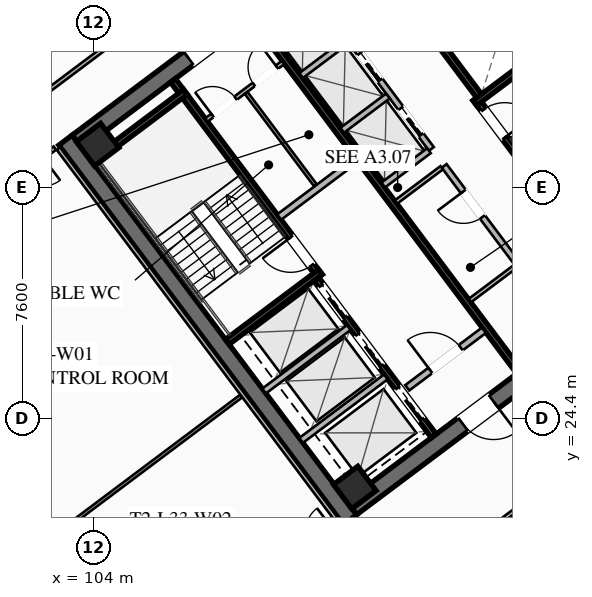
"""IFC4 building model, lengths in metres.
Left out: names, types, materials, properties, quantities, classifications, styles, units other than length and angle.
Written with IfcOpenShell. Run it as: python <this file> out.ifc"""

import sys

from ifc_helpers import new_model, si_unit, direction, frame, frame_2d, origin, origin_2d, place, context, subcontext, project, spatial, rectangle, hollow_rectangle, extrude, element, fill, save


model = new_model("IFC4")
c1 = context("Model", 3, precision=1e-05, world=origin(), true_north=direction((0.0, 1.0)))
c2 = subcontext(c1, "Body", "Model", "MODEL_VIEW")
j1 = project(units=[si_unit("LENGTHUNIT", "METRE"), si_unit("PLANEANGLEUNIT", "RADIAN")], contexts=[c1])
p1 = place(None, origin())
s1 = spatial("IfcSite", under=j1, at=p1, CompositionType="ELEMENT")
p2 = place(p1, origin())
s2 = spatial("IfcBuilding", under=s1, at=p2, CompositionType="ELEMENT")
p3 = place(p2, frame((0.0, 0.0, 125.05)))
s3 = spatial("IfcBuildingStorey", under=s2, at=p3, CompositionType="ELEMENT", Elevation=125.05)
for number, where, z_axis, x_axis in (
    (1, (112.436, 21.077, 0.0), (0.0, 0.0, 1.0), (-0.6, 0.8, 0.0)),
    (2, (115.564, 42.923, 0.0), (0.0, 0.0, 1.0), (0.6, -0.8, 0.0)),
):
    element("IfcWall", number, at=place(p3, frame(where, z_axis=z_axis, x_axis=x_axis)), inside=s3, PredefinedType="SHEAR", context=c2, shape_type="SweptSolid", body=[
        extrude(rectangle(XDim=15.6, YDim=0.55, at=frame_2d((7.8, 0.0))), origin(), (0.0, 0.0, 1.0), 3.55),
    ])
p4 = place(p3, frame((124.539, 30.498, 0.0), z_axis=(0.0, 0.0, 1.0), x_axis=(-0.799998054672, -0.600002593761, 0.0)))
e3 = element("IfcWall", 3, at=p4, inside=s3, PredefinedType="SHEAR", context=c2, shape_type="SweptSolid", body=[
    extrude(rectangle(XDim=15.06, YDim=0.55, at=frame_2d((7.53, 0.0))), origin(), (0.0, 0.0, 1.0), 3.55),
])
p5 = place(p4, frame((9.23, 0.0, 0.0)))
e4 = element("IfcOpeningElement", 4, at=p5, cuts=e3, PredefinedType="OPENING", context=c2, shape_type="SweptSolid", body=[
    extrude(rectangle(XDim=1.25, YDim=2.25, at=frame_2d((0.625, 1.125))), frame((0.0, 0.285, 0.0), z_axis=(0.0, -1.0, 0.0), x_axis=(1.0, 0.0, 0.0)), (0.0, 0.0, 1.0), 0.57),
])
p6 = place(p4, frame((4.18, 0.0, 0.0)))
e5 = element("IfcOpeningElement", 5, at=p6, cuts=e3, PredefinedType="OPENING", context=c2, shape_type="SweptSolid", body=[
    extrude(rectangle(XDim=1.25, YDim=2.25, at=frame_2d((0.625, 1.125))), frame((0.0, 0.285, 0.0), z_axis=(0.0, -1.0, 0.0), x_axis=(1.0, 0.0, 0.0)), (0.0, 0.0, 1.0), 0.57),
])
p7 = place(p3, frame((103.461, 33.502, 0.0), z_axis=(0.0, 0.0, 1.0), x_axis=(0.799998054672, 0.600002593761, 0.0)))
e6 = element("IfcWall", 6, at=p7, inside=s3, PredefinedType="SHEAR", context=c2, shape_type="SweptSolid", body=[
    extrude(rectangle(XDim=15.06, YDim=0.55, at=frame_2d((7.53, 0.0))), origin(), (0.0, 0.0, 1.0), 3.55),
])
p8 = place(p7, frame((4.58, 0.0, 0.0)))
e7 = element("IfcOpeningElement", 7, at=p8, cuts=e6, PredefinedType="OPENING", context=c2, shape_type="SweptSolid", body=[
    extrude(rectangle(XDim=1.25, YDim=2.25, at=frame_2d((0.625, 1.125))), frame((0.0, 0.285, 0.0), z_axis=(0.0, -1.0, 0.0), x_axis=(1.0, 0.0, 0.0)), (0.0, 0.0, 1.0), 0.57),
])
p9 = place(p7, frame((9.63, 0.0, 0.0)))
e8 = element("IfcOpeningElement", 8, at=p9, cuts=e6, PredefinedType="OPENING", context=c2, shape_type="SweptSolid", body=[
    extrude(rectangle(XDim=1.25, YDim=2.25, at=frame_2d((0.625, 1.125))), frame((0.0, 0.285, 0.0), z_axis=(0.0, -1.0, 0.0), x_axis=(1.0, 0.0, 0.0)), (0.0, 0.0, 1.0), 0.57),
])
for number, where, z_axis, x_axis in (
    (9, (112.59, 22.13, 0.0), (0.0, 0.0, 1.0), (0.8, 0.6, 0.0)),
    (10, (104.13, 33.41, 0.0), (0.0, 0.0, 1.0), (0.8, 0.6, 0.0)),
):
    element("IfcColumn", number, at=place(p3, frame(where, z_axis=z_axis, x_axis=x_axis)), inside=s3, PredefinedType="COLUMN", context=c2, shape_type="SweptSolid", body=[
        extrude(hollow_rectangle(XDim=1.0, YDim=1.0, WallThickness=0.04, at=origin_2d()), origin(), (0.0, 0.0, 1.0), 3.37),
    ])
p10 = place(p3, frame((111.44, 29.08, 0.0), z_axis=(0.0, 0.0, 1.0), x_axis=(-0.59999029481, 0.8000072788, 0.0)))
e11 = element("IfcWall", 11, at=p10, inside=s3, PredefinedType="SHEAR", context=c2, shape_type="SweptSolid", body=[
    extrude(rectangle(XDim=8.05, YDim=0.2, at=frame_2d((4.025, 0.0))), origin(), (0.0, 0.0, 1.0), 3.37),
])
p11 = place(p10, frame((0.45, 0.0, 0.0)))
e12 = element("IfcOpeningElement", 12, at=p11, cuts=e11, PredefinedType="OPENING", context=c2, shape_type="SweptSolid", body=[
    extrude(rectangle(XDim=1.15, YDim=2.2, at=frame_2d((0.575, 1.1))), frame((0.0, 0.11, 0.0), z_axis=(0.0, -1.0, 0.0), x_axis=(1.0, 0.0, 0.0)), (0.0, 0.0, 1.0), 0.22),
])
for number, where, z_axis, x_axis in (
    (13, (108.396, 26.922, 0.0), (0.0, 0.0, 1.0), (0.8, 0.6, 0.0)),
    (14, (103.956, 32.842, 0.0), (0.0, 0.0, 1.0), (0.8, 0.6, 0.0)),
):
    element("IfcWall", number, at=place(p3, frame(where, z_axis=z_axis, x_axis=x_axis)), inside=s3, PredefinedType="SHEAR", context=c2, shape_type="SweptSolid", body=[
        extrude(rectangle(XDim=3.83, YDim=0.2, at=frame_2d((1.915, 0.0))), origin(), (0.0, 0.0, 1.0), 3.37),
    ])
p12 = place(p3, frame((116.56, 34.92, 0.0), z_axis=(0.0, 0.0, 1.0), x_axis=(0.59999029481, -0.8000072788, 0.0)))
e15 = element("IfcWall", 15, at=p12, inside=s3, PredefinedType="SHEAR", context=c2, shape_type="SweptSolid", body=[
    extrude(rectangle(XDim=8.05, YDim=0.2, at=frame_2d((4.025, 0.0))), origin(), (0.0, 0.0, 1.0), 3.37),
])
p13 = place(p12, frame((0.45, 0.0, 0.0)))
e16 = element("IfcOpeningElement", 16, at=p13, cuts=e15, PredefinedType="OPENING", context=c2, shape_type="SweptSolid", body=[
    extrude(rectangle(XDim=1.15, YDim=2.2, at=frame_2d((0.575, 1.1))), frame((0.0, 0.11, 0.0), z_axis=(0.0, -1.0, 0.0), x_axis=(1.0, 0.0, 0.0)), (0.0, 0.0, 1.0), 0.22),
])
p14 = place(p3, frame((116.54, 34.78, 0.0), z_axis=(0.0, 0.0, 1.0), x_axis=(0.800015298837, 0.599979601008, 0.0)))
e17 = element("IfcWall", 17, at=p14, inside=s3, PredefinedType="SHEAR", context=c2, shape_type="SweptSolid", body=[
    extrude(rectangle(XDim=3.83, YDim=0.2, at=frame_2d((1.915, 0.0))), origin(), (0.0, 0.0, 1.0), 3.37),
])
p15 = place(p3, frame((117.998, 25.936, 0.0), z_axis=(0.0, 0.0, 1.0), x_axis=(-0.600002693989, 0.799997979501, 0.0)))
e18 = element("IfcWall", 18, at=p15, inside=s3, PredefinedType="SHEAR", context=c2, shape_type="SweptSolid", body=[
    extrude(rectangle(XDim=14.5, YDim=0.2, at=frame_2d((7.25, 0.0))), origin(), (0.0, 0.0, 1.0), 3.37),
])
p16 = place(p3, frame((110.104, 31.028, 0.0), z_axis=(0.0, 0.0, 1.0), x_axis=(0.800018601094, 0.59997519774, 0.0)))
e19 = element("IfcWall", 19, at=p16, inside=s3, PredefinedType="SOLIDWALL", context=c2, shape_type="SweptSolid", body=[
    extrude(rectangle(XDim=3.15, YDim=0.22, at=frame_2d((1.575, 0.0))), origin(), (0.0, 0.0, 1.0), 2.723),
])
p17 = place(p3, frame((114.316, 25.412, 0.0), z_axis=(0.0, 0.0, 1.0), x_axis=(0.800018601094, 0.59997519774, 0.0)))
e20 = element("IfcWall", 20, at=p17, inside=s3, PredefinedType="SOLIDWALL", context=c2, shape_type="SweptSolid", body=[
    extrude(rectangle(XDim=3.15, YDim=0.22, at=frame_2d((1.575, 0.0))), origin(), (0.0, 0.0, 1.0), 2.723),
])
p18 = place(p17, frame((0.95, 0.0, 0.0)))
e21 = element("IfcOpeningElement", 21, at=p18, cuts=e20, PredefinedType="OPENING", context=c2, shape_type="SweptSolid", body=[
    extrude(rectangle(XDim=1.25, YDim=2.25, at=frame_2d((0.625, 1.125))), frame((0.0, 0.12, 0.0), z_axis=(0.0, -1.0, 0.0), x_axis=(1.0, 0.0, 0.0)), (0.0, 0.0, 1.0), 0.24),
])
p19 = place(p3, frame((115.19, 23.83, 0.0), z_axis=(0.0, 0.0, 1.0), x_axis=(-0.599993943644, 0.800004542231, 0.0)))
e22 = element("IfcWall", 22, at=p19, inside=s3, PredefinedType="SHEAR", context=c2, shape_type="SweptSolid", body=[
    extrude(rectangle(XDim=6.45, YDim=0.2, at=frame_2d((3.225, 0.0))), origin(), (0.0, 0.0, 1.0), 3.37),
])
p20 = place(p19, frame((4.875, 0.0, 0.0)))
e23 = element("IfcOpeningElement", 23, at=p20, cuts=e22, PredefinedType="OPENING", context=c2, shape_type="SweptSolid", body=[
    extrude(rectangle(XDim=1.3, YDim=2.25, at=frame_2d((0.65, 1.125))), frame((0.0, 0.11, 0.0), z_axis=(0.0, -1.0, 0.0), x_axis=(1.0, 0.0, 0.0)), (0.0, 0.0, 1.0), 0.22),
])
p21 = place(p19, frame((2.875, 0.0, 0.0)))
e24 = element("IfcOpeningElement", 24, at=p21, cuts=e22, PredefinedType="OPENING", context=c2, shape_type="SweptSolid", body=[
    extrude(rectangle(XDim=1.3, YDim=2.25, at=frame_2d((0.65, 1.125))), frame((0.0, 0.11, 0.0), z_axis=(0.0, -1.0, 0.0), x_axis=(1.0, 0.0, 0.0)), (0.0, 0.0, 1.0), 0.22),
])
p22 = place(p19, frame((0.675, 0.0, 0.0)))
e25 = element("IfcOpeningElement", 25, at=p22, cuts=e22, PredefinedType="OPENING", context=c2, shape_type="SweptSolid", body=[
    extrude(rectangle(XDim=1.3, YDim=2.25, at=frame_2d((0.65, 1.125))), frame((0.0, 0.11, 0.0), z_axis=(0.0, -1.0, 0.0), x_axis=(1.0, 0.0, 0.0)), (0.0, 0.0, 1.0), 0.22),
])
for number, where, z_axis, x_axis in (
    (26, (110.826, 23.682, 0.0), (0.0, 0.0, 1.0), (0.8, 0.6, 0.0)),
    (27, (109.608, 25.306, 0.0), (0.0, 0.0, 1.0), (0.8, 0.6, 0.0)),
):
    element("IfcWall", number, at=place(p3, frame(where, z_axis=z_axis, x_axis=x_axis)), inside=s3, PredefinedType="SOLIDWALL", context=c2, shape_type="SweptSolid", body=[
        extrude(rectangle(XDim=3.48, YDim=0.2, at=frame_2d((1.74, 0.0))), origin(), (0.0, 0.0, 1.0), 3.37),
    ])
p23 = place(p3, frame((112.81, 40.17, 0.0), z_axis=(0.0, 0.0, 1.0), x_axis=(0.599993943644, -0.800004542231, 0.0)))
e28 = element("IfcWall", 28, at=p23, inside=s3, PredefinedType="SHEAR", context=c2, shape_type="SweptSolid", body=[
    extrude(rectangle(XDim=6.45, YDim=0.2, at=frame_2d((3.225, 0.0))), origin(), (0.0, 0.0, 1.0), 3.37),
])
p24 = place(p3, frame((107.71, 34.22, 0.0), z_axis=(0.0, 0.0, 1.0), x_axis=(0.799981399002, 0.60002480053, 0.0)))
e29 = element("IfcWall", 29, at=p24, inside=s3, PredefinedType="PARTITIONING", context=c2, shape_type="SweptSolid", body=[
    extrude(rectangle(XDim=3.15, YDim=0.135, at=frame_2d((1.575, 0.0))), origin(), (0.0, 0.0, 1.0), 2.723),
])
p25 = place(p24, frame((0.25, 0.0, 0.0)))
e30 = element("IfcOpeningElement", 30, at=p25, cuts=e29, PredefinedType="OPENING", context=c2, shape_type="SweptSolid", body=[
    extrude(rectangle(XDim=0.95, YDim=2.05, at=frame_2d((0.475, 1.025))), frame((0.0, 0.077, 0.0), z_axis=(0.0, -1.0, 0.0), x_axis=(1.0, 0.0, 0.0)), (0.0, 0.0, 1.0), 0.155),
])
p26 = place(p24, frame((1.95, 0.0, 0.0)))
e31 = element("IfcOpeningElement", 31, at=p26, cuts=e29, PredefinedType="OPENING", context=c2, shape_type="SweptSolid", body=[
    extrude(rectangle(XDim=0.95, YDim=2.05, at=frame_2d((0.475, 1.025))), frame((0.0, 0.077, 0.0), z_axis=(0.0, -1.0, 0.0), x_axis=(1.0, 0.0, 0.0)), (0.0, 0.0, 1.0), 0.155),
])
p27 = place(p3, frame((111.296, 32.072, 0.0), z_axis=(0.0, 0.0, 1.0), x_axis=(-0.59995887973, 0.800030838552, 0.0)))
e32 = element("IfcWall", 32, at=p27, inside=s3, PredefinedType="PARTITIONING", context=c2, shape_type="SweptSolid", body=[
    extrude(rectangle(XDim=3.8, YDim=0.11, at=frame_2d((1.9, 0.0))), origin(), (0.0, 0.0, 1.0), 2.723),
])
p28 = place(p3, frame((119.67, 27.19, 0.0), z_axis=(0.0, 0.0, 1.0), x_axis=(-0.599988677396, 0.800008491828, 0.0)))
e33 = element("IfcWall", 33, at=p28, inside=s3, PredefinedType="SOLIDWALL", context=c2, shape_type="SweptSolid", body=[
    extrude(rectangle(XDim=6.9, YDim=0.2, at=frame_2d((3.45, 0.0))), origin(), (0.0, 0.0, 1.0), 2.723),
])
p29 = place(p28, frame((0.85, 0.0, 0.0)))
e34 = element("IfcOpeningElement", 34, at=p29, cuts=e33, PredefinedType="OPENING", context=c2, shape_type="SweptSolid", body=[
    extrude(rectangle(XDim=0.95, YDim=2.05, at=frame_2d((0.475, 1.025))), frame((0.0, 0.11, 0.0), z_axis=(0.0, -1.0, 0.0), x_axis=(1.0, 0.0, 0.0)), (0.0, 0.0, 1.0), 0.22),
])
p30 = place(p28, frame((4.8, 0.0, 0.0)))
e35 = element("IfcOpeningElement", 35, at=p30, cuts=e33, PredefinedType="OPENING", context=c2, shape_type="SweptSolid", body=[
    extrude(rectangle(XDim=1.05, YDim=2.2, at=frame_2d((0.525, 1.1))), frame((0.0, 0.11, 0.0), z_axis=(0.0, -1.0, 0.0), x_axis=(1.0, 0.0, 0.0)), (0.0, 0.0, 1.0), 0.22),
])
for number, where, z_axis, x_axis in (
    (36, (113.946, 31.522, 0.0), (0.0, 0.0, 1.0), (0.8, 0.6, 0.0)),
    (37, (116.376, 28.282, 0.0), (0.0, 0.0, 1.0), (0.8, 0.6, 0.0)),
):
    element("IfcWall", number, at=place(p3, frame(where, z_axis=z_axis, x_axis=x_axis)), inside=s3, PredefinedType="PARTITIONING", context=c2, shape_type="SweptSolid", body=[
        extrude(rectangle(XDim=1.88, YDim=0.135, at=frame_2d((0.94, 0.0))), origin(), (0.0, 0.0, 1.0), 2.723),
    ])
p31 = place(p3, frame((115.11, 33.27, 0.0), z_axis=(0.0, 0.0, 1.0), x_axis=(-0.600011322243, 0.799991508192, 0.0)))
e38 = element("IfcWall", 38, at=p31, inside=s3, PredefinedType="SOLIDWALL", context=c2, shape_type="SweptSolid", body=[
    extrude(rectangle(XDim=6.9, YDim=0.2, at=frame_2d((3.45, 0.0))), origin(), (0.0, 0.0, 1.0), 3.37),
])
p32 = place(p31, frame((0.575, 0.0, 0.0)))
e39 = element("IfcOpeningElement", 39, at=p32, cuts=e38, PredefinedType="OPENING", context=c2, shape_type="SweptSolid", body=[
    extrude(rectangle(XDim=1.1, YDim=2.2, at=frame_2d((0.55, 1.1))), frame((0.0, 0.11, 0.0), z_axis=(0.0, -1.0, 0.0), x_axis=(1.0, 0.0, 0.0)), (0.0, 0.0, 1.0), 0.22),
])
p33 = place(p31, frame((2.825, 0.0, 0.0)))
e40 = element("IfcOpeningElement", 40, at=p33, cuts=e38, PredefinedType="OPENING", context=c2, shape_type="SweptSolid", body=[
    extrude(rectangle(XDim=1.1, YDim=2.2, at=frame_2d((0.55, 1.1))), frame((0.0, 0.11, 0.0), z_axis=(0.0, -1.0, 0.0), x_axis=(1.0, 0.0, 0.0)), (0.0, 0.0, 1.0), 0.22),
])
p34 = place(p31, frame((5.075, 0.0, 0.0)))
e41 = element("IfcOpeningElement", 41, at=p34, cuts=e38, PredefinedType="OPENING", context=c2, shape_type="SweptSolid", body=[
    extrude(rectangle(XDim=1.1, YDim=2.2, at=frame_2d((0.55, 1.1))), frame((0.0, 0.11, 0.0), z_axis=(0.0, -1.0, 0.0), x_axis=(1.0, 0.0, 0.0)), (0.0, 0.0, 1.0), 0.22),
])
p35 = place(p3, frame((113.526, 32.082, 0.0), z_axis=(0.0, 0.0, 1.0), x_axis=(0.800046745961, 0.599937666993, 0.0)))
e42 = element("IfcWall", 42, at=p35, inside=s3, PredefinedType="SOLIDWALL", context=c2, shape_type="SweptSolid", body=[
    extrude(rectangle(XDim=1.88, YDim=0.2, at=frame_2d((0.94, 0.0))), origin(), (0.0, 0.0, 1.0), 3.37),
])
p36 = place(p3, frame((112.176, 33.882, 0.0), z_axis=(0.0, 0.0, 1.0), x_axis=(0.8, 0.6, 0.0)))
e43 = element("IfcWall", 43, at=p36, inside=s3, PredefinedType="SOLIDWALL", context=c2, shape_type="SweptSolid", body=[
    extrude(rectangle(XDim=1.88, YDim=0.2, at=frame_2d((0.94, 0.0))), origin(), (0.0, 0.0, 1.0), 3.37),
])
p37 = place(p3, frame((110.826, 35.682, 0.0), z_axis=(0.0, 0.0, 1.0), x_axis=(0.799984418148, 0.600020775241, 0.0)))
e44 = element("IfcWall", 44, at=p37, inside=s3, PredefinedType="SOLIDWALL", context=c2, shape_type="SweptSolid", body=[
    extrude(rectangle(XDim=1.88, YDim=0.2, at=frame_2d((0.94, 0.0))), origin(), (0.0, 0.0, 1.0), 3.37),
])
p38 = place(p3, frame((95.81, 30.17, 0.0), z_axis=(0.0, 0.0, 1.0), x_axis=(0.8, 0.6, 0.0)))
e45 = element("IfcWall", 45, at=p38, inside=s3, PredefinedType="PARTITIONING", context=c2, shape_type="SweptSolid", body=[
    extrude(rectangle(XDim=31.3, YDim=0.135, at=frame_2d((15.65, 0.0))), origin(), (0.0, 0.0, 1.0), 2.723),
])
p39 = place(p38, frame((0.3, 0.0, 0.0)))
e46 = element("IfcOpeningElement", 46, at=p39, cuts=e45, PredefinedType="OPENING", context=c2, shape_type="SweptSolid", body=[
    extrude(rectangle(XDim=0.95, YDim=2.05, at=frame_2d((0.475, 1.025))), frame((0.0, 0.077, 0.0), z_axis=(0.0, -1.0, 0.0), x_axis=(1.0, 0.0, 0.0)), (0.0, 0.0, 1.0), 0.155),
])
p40 = place(p38, frame((15.438, 0.0, 0.0)))
e47 = element("IfcOpeningElement", 47, at=p40, cuts=e45, PredefinedType="OPENING", context=c2, shape_type="SweptSolid", body=[
    extrude(rectangle(XDim=0.95, YDim=2.05, at=frame_2d((0.475, 1.025))), frame((0.0, 0.077, 0.0), z_axis=(0.0, -1.0, 0.0), x_axis=(1.0, 0.0, 0.0)), (0.0, 0.0, 1.0), 0.155),
])
p41 = place(p38, frame((30.05, 0.0, 0.0)))
e48 = element("IfcOpeningElement", 48, at=p41, cuts=e45, PredefinedType="OPENING", context=c2, shape_type="SweptSolid", body=[
    extrude(rectangle(XDim=0.95, YDim=2.05, at=frame_2d((0.475, 1.025))), frame((0.0, 0.077, 0.0), z_axis=(0.0, -1.0, 0.0), x_axis=(1.0, 0.0, 0.0)), (0.0, 0.0, 1.0), 0.155),
])
p42 = place(p3, frame((133.012, 32.734, 0.0), z_axis=(0.0, 0.0, 1.0), x_axis=(-0.800003744006, -0.59999500796, 0.0)))
e49 = element("IfcWall", 49, at=p42, inside=s3, PredefinedType="PARTITIONING", context=c2, shape_type="SweptSolid", body=[
    extrude(rectangle(XDim=31.3, YDim=0.135, at=frame_2d((15.65, 0.0))), origin(), (0.0, 0.0, 1.0), 2.723),
])
p43 = place(p42, frame((29.97, 0.0, 0.0)))
e50 = element("IfcOpeningElement", 50, at=p43, cuts=e49, PredefinedType="OPENING", context=c2, shape_type="SweptSolid", body=[
    extrude(rectangle(XDim=0.95, YDim=2.05, at=frame_2d((0.475, 1.025))), frame((0.0, 0.077, 0.0), z_axis=(0.0, -1.0, 0.0), x_axis=(1.0, 0.0, 0.0)), (0.0, 0.0, 1.0), 0.155),
])
p44 = place(p42, frame((14.938, 0.0, 0.0)))
e51 = element("IfcOpeningElement", 51, at=p44, cuts=e49, PredefinedType="OPENING", context=c2, shape_type="SweptSolid", body=[
    extrude(rectangle(XDim=0.95, YDim=2.05, at=frame_2d((0.475, 1.025))), frame((0.0, 0.077, 0.0), z_axis=(0.0, -1.0, 0.0), x_axis=(1.0, 0.0, 0.0)), (0.0, 0.0, 1.0), 0.155),
])
p45 = place(p42, frame((0.38, 0.0, 0.0)))
e52 = element("IfcOpeningElement", 52, at=p45, cuts=e49, PredefinedType="OPENING", context=c2, shape_type="SweptSolid", body=[
    extrude(rectangle(XDim=0.95, YDim=2.05, at=frame_2d((0.475, 1.025))), frame((0.0, 0.077, 0.0), z_axis=(0.0, -1.0, 0.0), x_axis=(1.0, 0.0, 0.0)), (0.0, 0.0, 1.0), 0.155),
])
p46 = place(p3, frame((112.104, 20.928, 0.0), z_axis=(0.0, 0.0, 1.0), x_axis=(-0.599994940075, 0.800003794918, 0.0)))
e53 = element("IfcWall", 53, at=p46, inside=s3, PredefinedType="PARTITIONING", context=c2, shape_type="SweptSolid", body=[
    extrude(rectangle(XDim=15.44, YDim=0.135, at=frame_2d((7.72, 0.0))), origin(), (0.0, 0.0, 1.0), 2.723),
])
p47 = place(p3, frame((102.728, 33.296, 0.0), z_axis=(0.0, 0.0, 1.0), x_axis=(-0.800002918023, -0.599996109283, 0.0)))
e54 = element("IfcWall", 54, at=p47, inside=s3, PredefinedType="PARTITIONING", context=c2, shape_type="SweptSolid", body=[
    extrude(rectangle(XDim=10.04, YDim=0.135, at=frame_2d((5.02, 0.0))), origin(), (0.0, 0.0, 1.0), 2.723),
])
p48 = place(p47, frame((0.5, 0.0, 0.0)))
e55 = element("IfcOpeningElement", 55, at=p48, cuts=e54, PredefinedType="OPENING", context=c2, shape_type="SweptSolid", body=[
    extrude(rectangle(XDim=0.95, YDim=2.05, at=frame_2d((0.475, 1.025))), frame((0.0, 0.077, 0.0), z_axis=(0.0, -1.0, 0.0), x_axis=(1.0, 0.0, 0.0)), (0.0, 0.0, 1.0), 0.155),
])
p49 = place(p3, frame((100.816, 19.112, 0.0), z_axis=(0.0, 0.0, 1.0), x_axis=(0.800002918023, 0.599996109283, 0.0)))
e56 = element("IfcWall", 56, at=p49, inside=s3, PredefinedType="PARTITIONING", context=c2, shape_type="SweptSolid", body=[
    extrude(rectangle(XDim=10.04, YDim=0.11, at=frame_2d((5.02, 0.0))), origin(), (0.0, 0.0, 1.0), 2.723),
])
p50 = place(p8, origin())
e57 = element("IfcDoor", 57, at=p50, inside=s3, OperationType="SINGLE_SWING_LEFT", PredefinedType="DOOR", context=c2, shape_type="SweptSolid", body=[
    extrude(rectangle(XDim=1.25, YDim=2.25, at=frame_2d((0.625, 1.125))), frame((0.0, 0.025, 0.0), z_axis=(0.0, -1.0, 0.0), x_axis=(1.0, 0.0, 0.0)), (0.0, 0.0, 1.0), 0.05),
])
fill(e7, e57)
p51 = place(p5, origin())
e58 = element("IfcDoor", 58, at=p51, inside=s3, OperationType="SINGLE_SWING_LEFT", PredefinedType="DOOR", context=c2, shape_type="SweptSolid", body=[
    extrude(rectangle(XDim=1.25, YDim=2.25, at=frame_2d((0.625, 1.125))), frame((0.0, 0.025, 0.0), z_axis=(0.0, -1.0, 0.0), x_axis=(1.0, 0.0, 0.0)), (0.0, 0.0, 1.0), 0.05),
])
fill(e4, e58)
p52 = place(p11, origin())
e59 = element("IfcDoor", 59, at=p52, inside=s3, OperationType="SINGLE_SWING_RIGHT", PredefinedType="DOOR", context=c2, shape_type="SweptSolid", body=[
    extrude(rectangle(XDim=1.15, YDim=2.2, at=frame_2d((0.575, 1.1))), frame((0.0, 0.025, 0.0), z_axis=(0.0, -1.0, 0.0), x_axis=(1.0, 0.0, 0.0)), (0.0, 0.0, 1.0), 0.05),
])
fill(e12, e59)
p53 = place(p13, origin())
e60 = element("IfcDoor", 60, at=p53, inside=s3, OperationType="SINGLE_SWING_RIGHT", PredefinedType="DOOR", context=c2, shape_type="SweptSolid", body=[
    extrude(rectangle(XDim=1.15, YDim=2.2, at=frame_2d((0.575, 1.1))), frame((0.0, 0.025, 0.0), z_axis=(0.0, -1.0, 0.0), x_axis=(1.0, 0.0, 0.0)), (0.0, 0.0, 1.0), 0.05),
])
fill(e16, e60)
p54 = place(p18, origin())
e61 = element("IfcDoor", 61, at=p54, inside=s3, OperationType="SINGLE_SWING_LEFT", PredefinedType="DOOR", context=c2, shape_type="SweptSolid", body=[
    extrude(rectangle(XDim=1.25, YDim=2.25, at=frame_2d((0.625, 1.125))), frame((0.0, 0.025, 0.0), z_axis=(0.0, -1.0, 0.0), x_axis=(1.0, 0.0, 0.0)), (0.0, 0.0, 1.0), 0.05),
])
fill(e21, e61)
p55 = place(p25, origin())
e62 = element("IfcDoor", 62, at=p55, inside=s3, OperationType="SINGLE_SWING_LEFT", PredefinedType="DOOR", context=c2, shape_type="SweptSolid", body=[
    extrude(rectangle(XDim=0.95, YDim=2.05, at=frame_2d((0.475, 1.025))), frame((0.0, 0.025, 0.0), z_axis=(0.0, -1.0, 0.0), x_axis=(1.0, 0.0, 0.0)), (0.0, 0.0, 1.0), 0.05),
])
fill(e30, e62)
p56 = place(p26, origin())
e63 = element("IfcDoor", 63, at=p56, inside=s3, OperationType="SINGLE_SWING_RIGHT", PredefinedType="DOOR", context=c2, shape_type="SweptSolid", body=[
    extrude(rectangle(XDim=0.95, YDim=2.05, at=frame_2d((0.475, 1.025))), frame((0.0, 0.025, 0.0), z_axis=(0.0, -1.0, 0.0), x_axis=(1.0, 0.0, 0.0)), (0.0, 0.0, 1.0), 0.05),
])
fill(e31, e63)
p57 = place(p30, origin())
e64 = element("IfcDoor", 64, at=p57, inside=s3, OperationType="SINGLE_SWING_RIGHT", PredefinedType="DOOR", context=c2, shape_type="SweptSolid", body=[
    extrude(rectangle(XDim=1.05, YDim=2.2, at=frame_2d((0.525, 1.1))), frame((0.0, 0.025, 0.0), z_axis=(0.0, -1.0, 0.0), x_axis=(1.0, 0.0, 0.0)), (0.0, 0.0, 1.0), 0.05),
])
fill(e35, e64)
p58 = place(p20, origin())
e65 = element("IfcDoor", 65, at=p58, inside=s3, OperationType="SLIDING_TO_LEFT", PredefinedType="DOOR", context=c2, shape_type="SweptSolid", body=[
    extrude(rectangle(XDim=1.3, YDim=2.25, at=frame_2d((0.65, 1.125))), frame((0.0, 0.025, 0.0), z_axis=(0.0, -1.0, 0.0), x_axis=(1.0, 0.0, 0.0)), (0.0, 0.0, 1.0), 0.05),
])
fill(e23, e65)
p59 = place(p21, origin())
e66 = element("IfcDoor", 66, at=p59, inside=s3, OperationType="SLIDING_TO_LEFT", PredefinedType="DOOR", context=c2, shape_type="SweptSolid", body=[
    extrude(rectangle(XDim=1.3, YDim=2.25, at=frame_2d((0.65, 1.125))), frame((0.0, 0.025, 0.0), z_axis=(0.0, -1.0, 0.0), x_axis=(1.0, 0.0, 0.0)), (0.0, 0.0, 1.0), 0.05),
])
fill(e24, e66)
p60 = place(p22, origin())
e67 = element("IfcDoor", 67, at=p60, inside=s3, OperationType="SLIDING_TO_LEFT", PredefinedType="DOOR", context=c2, shape_type="SweptSolid", body=[
    extrude(rectangle(XDim=1.3, YDim=2.25, at=frame_2d((0.65, 1.125))), frame((0.0, 0.025, 0.0), z_axis=(0.0, -1.0, 0.0), x_axis=(1.0, 0.0, 0.0)), (0.0, 0.0, 1.0), 0.05),
])
fill(e25, e67)
p61 = place(p32, origin())
e68 = element("IfcDoor", 68, at=p61, inside=s3, OperationType="SLIDING_TO_LEFT", PredefinedType="DOOR", context=c2, shape_type="SweptSolid", body=[
    extrude(rectangle(XDim=1.1, YDim=2.2, at=frame_2d((0.55, 1.1))), frame((0.0, 0.025, 0.0), z_axis=(0.0, -1.0, 0.0), x_axis=(1.0, 0.0, 0.0)), (0.0, 0.0, 1.0), 0.05),
])
fill(e39, e68)
p62 = place(p33, origin())
e69 = element("IfcDoor", 69, at=p62, inside=s3, OperationType="SLIDING_TO_LEFT", PredefinedType="DOOR", context=c2, shape_type="SweptSolid", body=[
    extrude(rectangle(XDim=1.1, YDim=2.2, at=frame_2d((0.55, 1.1))), frame((0.0, 0.025, 0.0), z_axis=(0.0, -1.0, 0.0), x_axis=(1.0, 0.0, 0.0)), (0.0, 0.0, 1.0), 0.05),
])
fill(e40, e69)
save(model, sys.argv[1])
